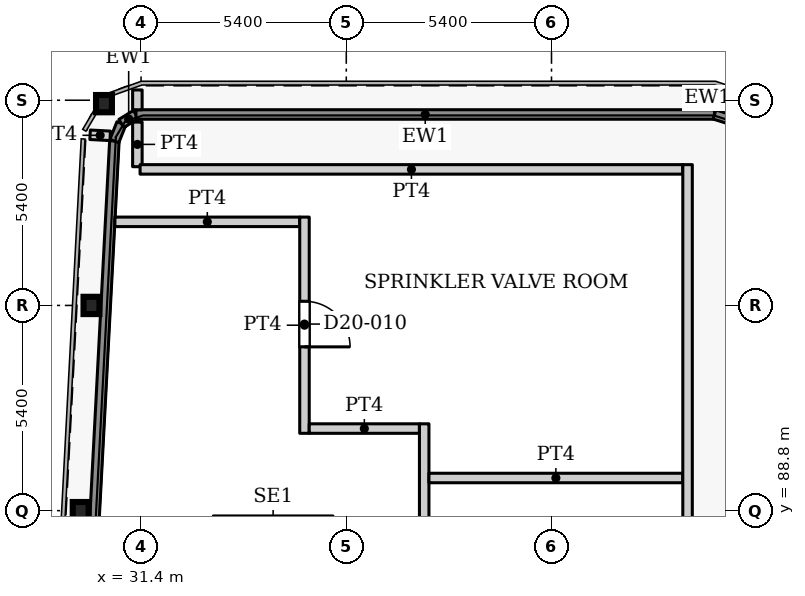
"""IFC4 building model, lengths in metres.
Left out: names, types, materials, properties, quantities, classifications, styles, units other than length and angle.
Written with IfcOpenShell. Run it as: python <this file> out.ifc"""

import sys

from ifc_helpers import new_model, si_unit, direction, frame, frame_2d, origin, origin_2d, place, context, subcontext, project, spatial, rectangle, i_section, extrude, source, transform, mapped, element, fill, save


model = new_model("IFC4")
c1 = context("Model", 3, precision=1e-05, world=origin(), true_north=direction((0.0, 1.0)))
c2 = subcontext(c1, "Body", "Model", "MODEL_VIEW")
j1 = project(units=[si_unit("LENGTHUNIT", "METRE"), si_unit("PLANEANGLEUNIT", "RADIAN")], contexts=[c1])
p1 = place(None, origin())
s1 = spatial("IfcSite", under=j1, at=p1, CompositionType="ELEMENT")
p2 = place(p1, origin())
s2 = spatial("IfcBuilding", under=s1, at=p2, CompositionType="ELEMENT")
p3 = place(p2, frame((0.0, 0.0, 89.0)))
s3 = spatial("IfcBuildingStorey", under=s2, at=p3, CompositionType="ELEMENT", Elevation=89.0)
for number, where, z_axis, x_axis in (
    (1, (29.811, 88.8, 0.0), (0.0, 0.0, 1.0), (1.0, 0.0, 0.0)),
    (2, (30.095, 94.2, 0.0), (0.0, 0.0, 1.0), (1.0, 0.0, 0.0)),
    (3, (30.424, 99.51, 0.0), (0.0, 0.0, 1.0), (1.0, 0.0, 0.0)),
):
    element("IfcColumn", number, at=place(p3, frame(where, z_axis=z_axis, x_axis=x_axis)), inside=s3, PredefinedType="COLUMN", context=c2, shape_type="SweptSolid", body=[
        extrude(i_section(OverallWidth=0.418, OverallDepth=0.455, WebThickness=0.042, FlangeThickness=0.068, FilletRadius=0.014, at=origin_2d()), origin(), (0.0, 0.0, 1.0), 5.1),
    ])
p4 = place(p3, frame((27.195, 31.969, 0.0), z_axis=(0.0, 0.0, 1.0), x_axis=(0.052556141556, 0.99861797099, 0.0)))
e4 = element("IfcWall", 4, at=p4, inside=s3, PredefinedType="SOLIDWALL", context=c2, shape_type="SweptSolid", body=[
    extrude(rectangle(XDim=66.651, YDim=0.25, at=frame_2d((33.326, 0.0))), origin(), (0.0, 0.0, 1.0), 4.95),
])
p5 = place(p3, frame((30.698, 98.528, 0.0), z_axis=(0.0, 0.0, 1.0), x_axis=(0.370881773365, 0.928680090336, 0.0)))
e5 = element("IfcWall", 5, at=p5, inside=s3, PredefinedType="SOLIDWALL", context=c2, shape_type="SweptSolid", body=[
    extrude(rectangle(XDim=0.496, YDim=0.25, at=frame_2d((0.248, 0.0))), origin(), (0.0, 0.0, 1.0), 4.95),
])
p6 = place(p3, frame((30.882, 98.989, 0.0), z_axis=(0.0, 0.0, 1.0), x_axis=(0.851899959866, 0.523704552568, 0.0)))
e6 = element("IfcWall", 6, at=p6, inside=s3, PredefinedType="SOLIDWALL", context=c2, shape_type="SweptSolid", body=[
    extrude(rectangle(XDim=0.451, YDim=0.25, at=frame_2d((0.225, 0.0))), origin(), (0.0, 0.0, 1.0), 4.95),
])
p7 = place(p3, frame((31.266, 99.225, 0.0), z_axis=(0.0, 0.0, 1.0), x_axis=(1.0, 0.0, 0.0)))
e7 = element("IfcWall", 7, at=p7, inside=s3, PredefinedType="SOLIDWALL", context=c2, shape_type="SweptSolid", body=[
    extrude(rectangle(XDim=15.223, YDim=0.25, at=frame_2d((7.611, 0.0))), origin(), (0.0, 0.0, 1.0), 4.95),
])
p8 = place(p3, frame((46.489, 99.225, 0.0), z_axis=(0.0, 0.0, 1.0), x_axis=(0.952979365451, -0.303035194367, 0.0)))
e8 = element("IfcWall", 8, at=p8, inside=s3, PredefinedType="SOLIDWALL", context=c2, shape_type="SweptSolid", body=[
    extrude(rectangle(XDim=0.479, YDim=0.25, at=frame_2d((0.239, 0.0))), origin(), (0.0, 0.0, 1.0), 4.95),
])
p9 = place(p3, frame((33.3, 88.56, 0.0), z_axis=(0.0, 0.0, 1.0), x_axis=(1.0, 0.0, 0.0)))
e9 = element("IfcWall", 9, at=p9, inside=s3, PredefinedType="SHEAR", context=c2, shape_type="SweptSolid", body=[
    extrude(rectangle(XDim=3.15, YDim=0.2, at=frame_2d((1.575, 0.0))), origin(), (0.0, 0.0, 1.0), 5.1),
])
p10 = place(p3, frame((30.059, 98.691, 0.0), z_axis=(0.0, 0.0, 1.0), x_axis=(0.998617829333, -0.052558833123, 0.0)))
e10 = element("IfcWall", 10, at=p10, inside=s3, PredefinedType="PARTITIONING", context=c2, shape_type="SweptSolid", body=[
    extrude(rectangle(XDim=0.53, YDim=0.25, at=frame_2d((0.265, 0.0))), origin(), (0.0, 0.0, 1.0), 4.8),
])
p11 = place(p3, frame((30.711, 96.4, 0.0), z_axis=(0.0, 0.0, 1.0), x_axis=(1.0, 0.0, 0.0)))
e11 = element("IfcWall", 11, at=p11, inside=s3, PredefinedType="PARTITIONING", context=c2, shape_type="SweptSolid", body=[
    extrude(rectangle(XDim=4.864, YDim=0.25, at=frame_2d((2.432, 0.0))), origin(), (0.0, 0.0, 1.0), 4.8),
])
p12 = place(p3, frame((31.303, 97.851, 0.0), z_axis=(0.0, 0.0, 1.0), x_axis=(0.0, 1.0, 0.0)))
e12 = element("IfcWall", 12, at=p12, inside=s3, PredefinedType="PARTITIONING", context=c2, shape_type="SweptSolid", body=[
    extrude(rectangle(XDim=1.174, YDim=0.25, at=frame_2d((0.587, 0.0))), origin(), (0.0, 0.0, 1.0), 4.8),
])
p13 = place(p3, frame((31.303, 99.349, 0.0), z_axis=(0.0, 0.0, 1.0), x_axis=(0.0, 1.0, 0.0)))
e13 = element("IfcWall", 13, at=p13, inside=s3, PredefinedType="PARTITIONING", context=c2, shape_type="SweptSolid", body=[
    extrude(rectangle(XDim=0.522, YDim=0.25, at=frame_2d((0.261, 0.0))), origin(), (0.0, 0.0, 1.0), 4.8),
])
p14 = place(p3, frame((31.374, 97.78, 0.0), z_axis=(0.0, 0.0, 1.0), x_axis=(1.0, 0.0, 0.0)))
e14 = element("IfcWall", 14, at=p14, inside=s3, PredefinedType="PARTITIONING", context=c2, shape_type="SweptSolid", body=[
    extrude(rectangle(XDim=14.281, YDim=0.25, at=frame_2d((7.141, 0.0))), origin(), (0.0, 0.0, 1.0), 4.8),
])
p15 = place(p3, frame((35.7, 90.835, 0.0), z_axis=(0.0, 0.0, 1.0), x_axis=(0.0, 1.0, 0.0)))
e15 = element("IfcWall", 15, at=p15, inside=s3, PredefinedType="PARTITIONING", context=c2, shape_type="SweptSolid", body=[
    extrude(rectangle(XDim=5.69, YDim=0.25, at=frame_2d((2.845, 0.0))), origin(), (0.0, 0.0, 1.0), 4.8),
])
p16 = place(p15, frame((2.275, 0.0, 0.0)))
e16 = element("IfcOpeningElement", 16, at=p16, cuts=e15, PredefinedType="OPENING", context=c2, shape_type="SweptSolid", body=[
    extrude(rectangle(XDim=1.2, YDim=2.1, at=frame_2d((0.6, 1.05))), frame((0.0, 0.135, 0.0), z_axis=(0.0, -1.0, 0.0), x_axis=(1.0, 0.0, 0.0)), (0.0, 0.0, 1.0), 0.27),
])
p17 = place(p3, frame((35.825, 90.96, 0.0), z_axis=(0.0, 0.0, 1.0), x_axis=(1.0, 0.0, 0.0)))
e17 = element("IfcWall", 17, at=p17, inside=s3, PredefinedType="PARTITIONING", context=c2, shape_type="SweptSolid", body=[
    extrude(rectangle(XDim=2.9, YDim=0.25, at=frame_2d((1.45, 0.0))), origin(), (0.0, 0.0, 1.0), 4.8),
])
p18 = place(p3, frame((38.85, 76.875, 0.0), z_axis=(0.0, 0.0, 1.0), x_axis=(0.0, 1.0, 0.0)))
e18 = element("IfcWall", 18, at=p18, inside=s3, PredefinedType="PARTITIONING", context=c2, shape_type="SweptSolid", body=[
    extrude(rectangle(XDim=14.21, YDim=0.25, at=frame_2d((7.105, 0.0))), origin(), (0.0, 0.0, 1.0), 4.8),
])
p19 = place(p18, frame((6.972, 0.0, 0.0)))
e19 = element("IfcOpeningElement", 19, at=p19, cuts=e18, PredefinedType="OPENING", context=c2, shape_type="SweptSolid", body=[
    extrude(rectangle(XDim=1.2, YDim=2.1, at=frame_2d((0.6, 1.05))), frame((0.0, 0.135, 0.0), z_axis=(0.0, -1.0, 0.0), x_axis=(1.0, 0.0, 0.0)), (0.0, 0.0, 1.0), 0.27),
])
p20 = place(p3, frame((38.975, 89.659, 0.0), z_axis=(0.0, 0.0, 1.0), x_axis=(1.0, 0.0, 0.0)))
e20 = element("IfcWall", 20, at=p20, inside=s3, PredefinedType="PARTITIONING", context=c2, shape_type="SweptSolid", body=[
    extrude(rectangle(XDim=6.68, YDim=0.25, at=frame_2d((3.34, 0.0))), origin(), (0.0, 0.0, 1.0), 4.8),
])
p21 = place(p3, frame((45.78, 69.236, 0.0), z_axis=(0.0, 0.0, 1.0), x_axis=(0.0, 1.0, 0.0)))
e21 = element("IfcWall", 21, at=p21, inside=s3, PredefinedType="PARTITIONING", context=c2, shape_type="SweptSolid", body=[
    extrude(rectangle(XDim=28.669, YDim=0.25, at=frame_2d((14.334, 0.0))), origin(), (0.0, 0.0, 1.0), 4.8),
])
m1 = source(origin(), c2, "Body", "SweptSolid", [
    extrude(rectangle(XDim=1.2, YDim=2.1, at=frame_2d((0.6, 1.05))), frame((0.0, 0.025, 0.0), z_axis=(0.0, -1.0, 0.0), x_axis=(1.0, 0.0, 0.0)), (0.0, 0.0, 1.0), 0.05),
])
p22 = place(p16, origin())
e22 = element("IfcDoor", 22, at=p22, inside=s3, OperationType="SINGLE_SWING_RIGHT", PredefinedType="DOOR", context=c2, shape_type="MappedRepresentation", body=[
    mapped(m1, transform((0.0, 0.0, 0.0), x_axis=(1.0, 0.0, 0.0), y_axis=(0.0, 1.0, 0.0), z_axis=(0.0, 0.0, 1.0), scale=1.0)),
])
fill(e16, e22)
save(model, sys.argv[1])
